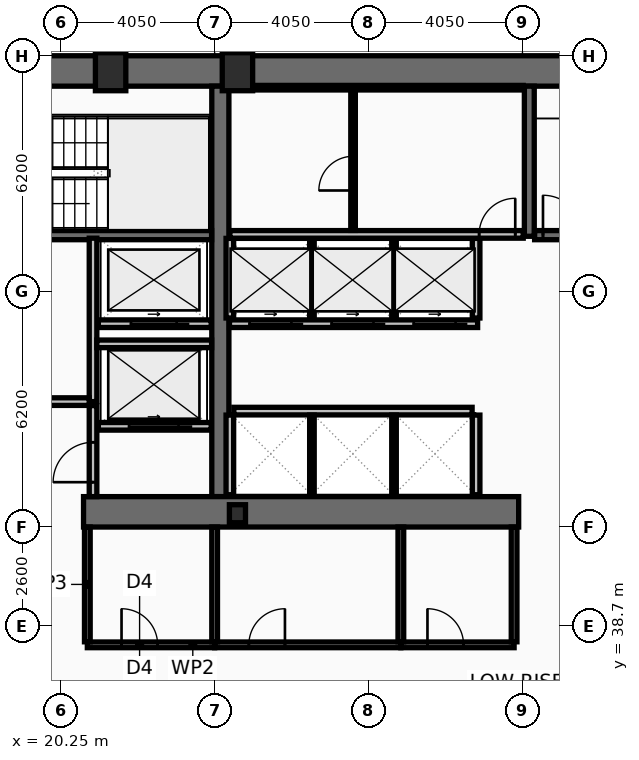
"""IFC4 building model, lengths in metres.
Left out: names, types, materials, properties, quantities, classifications, styles, units other than length and angle.
Written with IfcOpenShell. Run it as: python <this file> out.ifc"""

import sys

from ifc_helpers import new_model, si_unit, direction, frame, frame_2d, origin, origin_2d, place, context, subcontext, project, spatial, rectangle, hollow_rectangle, i_section, extrude, element, fill, save


model = new_model("IFC4")
c1 = context("Model", 3, precision=1e-05, world=origin(), true_north=direction((0.0, 1.0)))
c2 = subcontext(c1, "Body", "Model", "MODEL_VIEW")
j1 = project(units=[si_unit("LENGTHUNIT", "METRE"), si_unit("PLANEANGLEUNIT", "RADIAN")], contexts=[c1])
p1 = place(None, origin())
s1 = spatial("IfcSite", under=j1, at=p1, CompositionType="ELEMENT")
p2 = place(p1, origin())
s2 = spatial("IfcBuilding", under=s1, at=p2, CompositionType="ELEMENT")
p3 = place(p2, frame((0.0, 0.0, 65.8)))
s3 = spatial("IfcBuildingStorey", under=s2, at=p3, CompositionType="ELEMENT", Elevation=65.8)
p4 = place(p3, frame((16.2, 53.3, 0.0), z_axis=(0.0, 0.0, 1.0), x_axis=(1.0, 0.0, 0.0)))
e1 = element("IfcWall", 1, at=p4, inside=s3, PredefinedType="SHEAR", context=c2, shape_type="SweptSolid", body=[
    extrude(rectangle(XDim=40.5, YDim=0.8, at=frame_2d((20.25, 0.0))), origin(), (0.0, 0.0, 1.0), 3.82),
])
p5 = place(p3, frame((24.45, 42.1, 0.0), z_axis=(0.0, 0.0, 1.0), x_axis=(0.0, 1.0, 0.0)))
e2 = element("IfcWall", 2, at=p5, inside=s3, PredefinedType="SHEAR", context=c2, shape_type="SweptSolid", body=[
    extrude(rectangle(XDim=10.8, YDim=0.45, at=frame_2d((5.4, 0.0))), origin(), (0.0, 0.0, 1.0), 3.82),
])
p6 = place(p3, frame((32.3, 41.7, 0.0), z_axis=(0.0, 0.0, 1.0), x_axis=(-1.0, 0.0, 0.0)))
e3 = element("IfcWall", 3, at=p6, inside=s3, PredefinedType="SHEAR", context=c2, shape_type="SweptSolid", body=[
    extrude(rectangle(XDim=11.45, YDim=0.8, at=frame_2d((5.725, 0.0))), origin(), (0.0, 0.0, 1.0), 3.82),
])
p7 = place(p3, frame((32.58, 48.95, 0.0), z_axis=(0.0, 0.0, 1.0), x_axis=(0.0, 1.0, 0.0)))
e4 = element("IfcWall", 4, at=p7, inside=s3, PredefinedType="SHEAR", context=c2, shape_type="SweptSolid", body=[
    extrude(rectangle(XDim=3.95, YDim=0.26, at=frame_2d((1.975, 0.0))), origin(), (0.0, 0.0, 1.0), 3.82),
])
p8 = place(p3, frame((17.0, 48.98, 0.0), z_axis=(0.0, 0.0, 1.0), x_axis=(1.0, 0.0, 0.0)))
e5 = element("IfcWall", 5, at=p8, inside=s3, PredefinedType="SHEAR", context=c2, shape_type="SweptSolid", body=[
    extrude(rectangle(XDim=7.22, YDim=0.24, at=frame_2d((3.61, 0.0))), origin(), (0.0, 0.0, 1.0), 3.82),
])
p9 = place(p8, frame((0.22, 0.0, 0.0)))
e6 = element("IfcOpeningElement", 6, at=p9, cuts=e5, PredefinedType="OPENING", context=c2, shape_type="SweptSolid", body=[
    extrude(rectangle(XDim=1.05, YDim=2.15, at=frame_2d((0.525, 1.075))), frame((0.0, 0.13, 0.0), z_axis=(0.0, -1.0, 0.0), x_axis=(1.0, 0.0, 0.0)), (0.0, 0.0, 1.0), 0.26),
])
p10 = place(p3, frame((32.72, 48.98, 0.0), z_axis=(0.0, 0.0, 1.0), x_axis=(1.0, 0.0, 0.0)))
e7 = element("IfcWall", 7, at=p10, inside=s3, PredefinedType="SHEAR", context=c2, shape_type="SweptSolid", body=[
    extrude(rectangle(XDim=7.56, YDim=0.24, at=frame_2d((3.78, 0.0))), origin(), (0.0, 0.0, 1.0), 3.82),
])
p11 = place(p10, frame((0.22, 0.0, 0.0)))
e8 = element("IfcOpeningElement", 8, at=p11, cuts=e7, PredefinedType="OPENING", context=c2, shape_type="SweptSolid", body=[
    extrude(rectangle(XDim=1.05, YDim=2.15, at=frame_2d((0.525, 1.075))), frame((0.0, 0.13, 0.0), z_axis=(0.0, -1.0, 0.0), x_axis=(1.0, 0.0, 0.0)), (0.0, 0.0, 1.0), 0.26),
])
for number, where, z_axis, x_axis in (
    (9, (21.562, 53.28, 0.0), (0.0, 0.0, 1.0), (1.0, 0.0, 0.0)),
    (10, (24.9, 53.28, 0.0), (0.0, 0.0, 1.0), (1.0, 0.0, 0.0)),
):
    element("IfcColumn", number, at=place(p3, frame(where, z_axis=z_axis, x_axis=x_axis)), inside=s3, PredefinedType="COLUMN", context=c2, shape_type="SweptSolid", body=[
        extrude(hollow_rectangle(XDim=0.8, YDim=1.0, WallThickness=0.055, at=origin_2d()), origin(), (0.0, 0.0, 1.0), 4.0),
    ])
p12 = place(p3, frame((24.9, 41.65, 0.0), z_axis=(0.0, 0.0, 1.0), x_axis=(1.0, 0.0, 0.0)))
e11 = element("IfcColumn", 11, at=p12, inside=s3, PredefinedType="COLUMN", context=c2, shape_type="SweptSolid", body=[
    extrude(i_section(OverallWidth=0.424, OverallDepth=0.474, WebThickness=0.048, FlangeThickness=0.077, at=origin_2d()), origin(), (0.0, 0.0, 1.0), 4.0),
])
p13 = place(p3, frame((24.21, 43.95, 0.0), z_axis=(0.0, 0.0, 1.0), x_axis=(-1.0, 0.0, 0.0)))
e12 = element("IfcWall", 12, at=p13, inside=s3, PredefinedType="PARTITIONING", context=c2, shape_type="SweptSolid", body=[
    extrude(rectangle(XDim=2.97, YDim=0.2, at=frame_2d((1.485, 0.0))), origin(), (0.0, 0.0, 1.0), 3.82),
])
p14 = place(p13, frame((0.86, 0.0, 0.0)))
e13 = element("IfcOpeningElement", 13, at=p14, cuts=e12, PredefinedType="OPENING", context=c2, shape_type="SweptSolid", body=[
    extrude(rectangle(XDim=1.3, YDim=2.18, at=frame_2d((0.65, 1.09))), frame((0.0, 0.11, 0.0), z_axis=(0.0, -1.0, 0.0), x_axis=(1.0, 0.0, 0.0)), (0.0, 0.0, 1.0), 0.22),
])
p15 = place(p3, frame((24.21, 46.65, 0.0), z_axis=(0.0, 0.0, 1.0), x_axis=(-1.0, 0.0, 0.0)))
e14 = element("IfcWall", 14, at=p15, inside=s3, PredefinedType="PARTITIONING", context=c2, shape_type="SweptSolid", body=[
    extrude(rectangle(XDim=2.97, YDim=0.2, at=frame_2d((1.485, 0.0))), origin(), (0.0, 0.0, 1.0), 3.82),
])
p16 = place(p15, frame((0.91, 0.0, 0.0)))
e15 = element("IfcOpeningElement", 15, at=p16, cuts=e14, PredefinedType="OPENING", context=c2, shape_type="SweptSolid", body=[
    extrude(rectangle(XDim=1.2, YDim=2.18, at=frame_2d((0.6, 1.09))), frame((0.0, 0.11, 0.0), z_axis=(0.0, -1.0, 0.0), x_axis=(1.0, 0.0, 0.0)), (0.0, 0.0, 1.0), 0.22),
])
p17 = place(p3, frame((31.22, 46.65, 0.0), z_axis=(0.0, 0.0, 1.0), x_axis=(-1.0, 0.0, 0.0)))
e16 = element("IfcWall", 16, at=p17, inside=s3, PredefinedType="PARTITIONING", context=c2, shape_type="SweptSolid", body=[
    extrude(rectangle(XDim=6.53, YDim=0.2, at=frame_2d((3.265, 0.0))), origin(), (0.0, 0.0, 1.0), 3.82),
])
p18 = place(p17, frame((4.9, 0.0, 0.0)))
e17 = element("IfcOpeningElement", 17, at=p18, cuts=e16, PredefinedType="OPENING", context=c2, shape_type="SweptSolid", body=[
    extrude(rectangle(XDim=1.1, YDim=2.18, at=frame_2d((0.55, 1.09))), frame((0.0, 0.11, 0.0), z_axis=(0.0, -1.0, 0.0), x_axis=(1.0, 0.0, 0.0)), (0.0, 0.0, 1.0), 0.22),
])
p19 = place(p17, frame((2.74, 0.0, 0.0)))
e18 = element("IfcOpeningElement", 18, at=p19, cuts=e16, PredefinedType="OPENING", context=c2, shape_type="SweptSolid", body=[
    extrude(rectangle(XDim=1.1, YDim=2.18, at=frame_2d((0.55, 1.09))), frame((0.0, 0.11, 0.0), z_axis=(0.0, -1.0, 0.0), x_axis=(1.0, 0.0, 0.0)), (0.0, 0.0, 1.0), 0.22),
])
p20 = place(p17, frame((0.58, 0.0, 0.0)))
e19 = element("IfcOpeningElement", 19, at=p20, cuts=e16, PredefinedType="OPENING", context=c2, shape_type="SweptSolid", body=[
    extrude(rectangle(XDim=1.1, YDim=2.18, at=frame_2d((0.55, 1.09))), frame((0.0, 0.11, 0.0), z_axis=(0.0, -1.0, 0.0), x_axis=(1.0, 0.0, 0.0)), (0.0, 0.0, 1.0), 0.22),
])
p21 = place(p3, frame((21.1, 44.6, 0.0), z_axis=(0.0, 0.0, 1.0), x_axis=(0.0, 1.0, 0.0)))
e20 = element("IfcWall", 20, at=p21, inside=s3, PredefinedType="PARTITIONING", context=c2, shape_type="SweptSolid", body=[
    extrude(rectangle(XDim=4.3, YDim=0.2, at=frame_2d((2.15, 0.0))), origin(), (0.0, 0.0, 1.0), 3.82),
])
p22 = place(p3, frame((17.0, 44.6, 0.0), z_axis=(0.0, 0.0, 1.0), x_axis=(1.0, 0.0, 0.0)))
e21 = element("IfcWall", 21, at=p22, inside=s3, PredefinedType="PARTITIONING", context=c2, shape_type="SweptSolid", body=[
    extrude(rectangle(XDim=4.0, YDim=0.2, at=frame_2d((2.0, 0.0))), origin(), (0.0, 0.0, 1.0), 3.82),
])
p23 = place(p22, frame((1.25, 0.0, 0.0)))
e22 = element("IfcOpeningElement", 22, at=p23, cuts=e21, PredefinedType="OPENING", context=c2, shape_type="SweptSolid", body=[
    extrude(rectangle(XDim=1.05, YDim=2.15, at=frame_2d((0.525, 1.075))), frame((0.0, 0.11, 0.0), z_axis=(0.0, -1.0, 0.0), x_axis=(1.0, 0.0, 0.0)), (0.0, 0.0, 1.0), 0.22),
])
p24 = place(p3, frame((21.2, 46.12, 0.0), z_axis=(0.0, 0.0, 1.0), x_axis=(1.0, 0.0, 0.0)))
e23 = element("IfcWall", 23, at=p24, inside=s3, PredefinedType="PARTITIONING", context=c2, shape_type="SweptSolid", body=[
    extrude(rectangle(XDim=3.02, YDim=0.2, at=frame_2d((1.51, 0.0))), origin(), (0.0, 0.0, 1.0), 3.82),
])
p25 = place(p3, frame((21.1, 42.1, 0.0), z_axis=(0.0, 0.0, 1.0), x_axis=(0.0, 1.0, 0.0)))
e24 = element("IfcWall", 24, at=p25, inside=s3, PredefinedType="PARTITIONING", context=c2, shape_type="SweptSolid", body=[
    extrude(rectangle(XDim=2.395, YDim=0.2, at=frame_2d((1.198, 0.0))), origin(), (0.0, 0.0, 1.0), 3.82),
])
p26 = place(p25, frame((0.38, 0.0, 0.0)))
e25 = element("IfcOpeningElement", 25, at=p26, cuts=e24, PredefinedType="OPENING", context=c2, shape_type="SweptSolid", body=[
    extrude(rectangle(XDim=1.05, YDim=2.15, at=frame_2d((0.525, 1.075))), frame((0.0, 0.11, 0.0), z_axis=(0.0, -1.0, 0.0), x_axis=(1.0, 0.0, 0.0)), (0.0, 0.0, 1.0), 0.22),
])
for number, where, z_axis, x_axis in (
    (26, (24.7, 46.8, 0.0), (0.0, 0.0, 1.0), (0.0, 1.0, 0.0)),
    (27, (31.18, 46.8, 0.0), (0.0, 0.0, 1.0), (0.0, 1.0, 0.0)),
):
    element("IfcWall", number, at=place(p3, frame(where, z_axis=z_axis, x_axis=x_axis)), inside=s3, PredefinedType="PARTITIONING", context=c2, shape_type="SweptSolid", body=[
        extrude(rectangle(XDim=2.095, YDim=0.2, at=frame_2d((1.047, 0.0))), origin(), (0.0, 0.0, 1.0), 3.82),
    ])
for number, where, z_axis, x_axis in (
    (28, (26.86, 46.8, 0.0), (0.0, 0.0, 1.0), (0.0, 1.0, 0.0)),
    (29, (29.02, 46.8, 0.0), (0.0, 0.0, 1.0), (0.0, 1.0, 0.0)),
):
    element("IfcWall", number, at=place(p3, frame(where, z_axis=z_axis, x_axis=x_axis)), inside=s3, PredefinedType="PARTITIONING", context=c2, shape_type="SweptSolid", body=[
        extrude(rectangle(XDim=2.095, YDim=0.12, at=frame_2d((1.047, 0.0))), origin(), (0.0, 0.0, 1.0), 3.82),
    ])
p27 = place(p3, frame((24.805, 44.35, 0.0), z_axis=(0.0, 0.0, 1.0), x_axis=(1.0, 0.0, 0.0)))
e30 = element("IfcWall", 30, at=p27, inside=s3, PredefinedType="PARTITIONING", context=c2, shape_type="SweptSolid", body=[
    extrude(rectangle(XDim=6.27, YDim=0.2, at=frame_2d((3.135, 0.0))), origin(), (0.0, 0.0, 1.0), 3.82),
])
for number, where, z_axis, x_axis in (
    (31, (24.7, 42.15, 0.0), (0.0, 0.0, 1.0), (0.0, 1.0, 0.0)),
    (32, (31.18, 42.15, 0.0), (0.0, 0.0, 1.0), (0.0, 1.0, 0.0)),
):
    element("IfcWall", number, at=place(p3, frame(where, z_axis=z_axis, x_axis=x_axis)), inside=s3, PredefinedType="PARTITIONING", context=c2, shape_type="SweptSolid", body=[
        extrude(rectangle(XDim=2.095, YDim=0.2, at=frame_2d((1.048, 0.0))), origin(), (0.0, 0.0, 1.0), 3.82),
    ])
for number, where, z_axis, x_axis in (
    (33, (26.86, 42.15, 0.0), (0.0, 0.0, 1.0), (0.0, 1.0, 0.0)),
    (34, (29.02, 42.15, 0.0), (0.0, 0.0, 1.0), (0.0, 1.0, 0.0)),
):
    element("IfcWall", number, at=place(p3, frame(where, z_axis=z_axis, x_axis=x_axis)), inside=s3, PredefinedType="PARTITIONING", context=c2, shape_type="SweptSolid", body=[
        extrude(rectangle(XDim=2.095, YDim=0.12, at=frame_2d((1.048, 0.0))), origin(), (0.0, 0.0, 1.0), 3.82),
    ])
p28 = place(p3, frame((24.7, 52.86, 0.0), z_axis=(0.0, 0.0, 1.0), x_axis=(1.0, 0.0, 0.0)))
e35 = element("IfcWall", 35, at=p28, inside=s3, PredefinedType="PARTITIONING", context=c2, shape_type="SweptSolid", body=[
    extrude(rectangle(XDim=7.72, YDim=0.12, at=frame_2d((3.86, 0.0))), origin(), (0.0, 0.0, 1.0), 3.82),
])
p29 = place(p3, frame((24.7, 49.0, 0.0), z_axis=(0.0, 0.0, 1.0), x_axis=(1.0, 0.0, 0.0)))
e36 = element("IfcWall", 36, at=p29, inside=s3, PredefinedType="PARTITIONING", context=c2, shape_type="SweptSolid", body=[
    extrude(rectangle(XDim=7.72, YDim=0.2, at=frame_2d((3.86, 0.0))), origin(), (0.0, 0.0, 1.0), 3.82),
])
p30 = place(p29, frame((6.56, 0.0, 0.0)))
e37 = element("IfcOpeningElement", 37, at=p30, cuts=e36, PredefinedType="OPENING", context=c2, shape_type="SweptSolid", body=[
    extrude(rectangle(XDim=0.95, YDim=2.1, at=frame_2d((0.475, 1.05))), frame((0.0, 0.11, 0.0), z_axis=(0.0, -1.0, 0.0), x_axis=(1.0, 0.0, 0.0)), (0.0, 0.0, 1.0), 0.22),
])
p31 = place(p3, frame((27.942, 49.105, 0.0), z_axis=(0.0, 0.0, 1.0), x_axis=(0.0, 1.0, 0.0)))
e38 = element("IfcWall", 38, at=p31, inside=s3, PredefinedType="PARTITIONING", context=c2, shape_type="SweptSolid", body=[
    extrude(rectangle(XDim=3.69, YDim=0.12, at=frame_2d((1.845, 0.0))), origin(), (0.0, 0.0, 1.0), 3.82),
])
p32 = place(p31, frame((1.05, 0.0, 0.0)))
e39 = element("IfcOpeningElement", 39, at=p32, cuts=e38, PredefinedType="OPENING", context=c2, shape_type="SweptSolid", body=[
    extrude(rectangle(XDim=0.9, YDim=2.05, at=frame_2d((0.45, 1.025))), frame((0.0, 0.07, 0.0), z_axis=(0.0, -1.0, 0.0), x_axis=(1.0, 0.0, 0.0)), (0.0, 0.0, 1.0), 0.14),
])
p33 = place(p3, frame((20.95, 38.2, 0.0), z_axis=(0.0, 0.0, 1.0), x_axis=(1.0, 0.0, 0.0)))
e40 = element("IfcWall", 40, at=p33, inside=s3, PredefinedType="PARTITIONING", context=c2, shape_type="SweptSolid", body=[
    extrude(rectangle(XDim=3.35, YDim=0.15, at=frame_2d((1.675, 0.0))), origin(), (0.0, 0.0, 1.0), 3.82),
])
p34 = place(p33, frame((0.9, 0.0, 0.0)))
e41 = element("IfcOpeningElement", 41, at=p34, cuts=e40, PredefinedType="OPENING", context=c2, shape_type="SweptSolid", body=[
    extrude(rectangle(XDim=0.95, YDim=2.05, at=frame_2d((0.475, 1.025))), frame((0.0, 0.085, 0.0), z_axis=(0.0, -1.0, 0.0), x_axis=(1.0, 0.0, 0.0)), (0.0, 0.0, 1.0), 0.17),
])
p35 = place(p3, frame((24.3, 38.2, 0.0), z_axis=(0.0, 0.0, 1.0), x_axis=(1.0, 0.0, 0.0)))
e42 = element("IfcWall", 42, at=p35, inside=s3, PredefinedType="PARTITIONING", context=c2, shape_type="SweptSolid", body=[
    extrude(rectangle(XDim=4.9, YDim=0.15, at=frame_2d((2.45, 0.0))), origin(), (0.0, 0.0, 1.0), 3.01),
])
p36 = place(p35, frame((0.9, 0.0, 0.0)))
e43 = element("IfcOpeningElement", 43, at=p36, cuts=e42, PredefinedType="OPENING", context=c2, shape_type="SweptSolid", body=[
    extrude(rectangle(XDim=0.95, YDim=2.05, at=frame_2d((0.475, 1.025))), frame((0.0, 0.085, 0.0), z_axis=(0.0, -1.0, 0.0), x_axis=(1.0, 0.0, 0.0)), (0.0, 0.0, 1.0), 0.17),
])
p37 = place(p3, frame((29.2, 38.2, 0.0), z_axis=(0.0, 0.0, 1.0), x_axis=(1.0, 0.0, 0.0)))
e44 = element("IfcWall", 44, at=p37, inside=s3, PredefinedType="PARTITIONING", context=c2, shape_type="SweptSolid", body=[
    extrude(rectangle(XDim=2.98, YDim=0.15, at=frame_2d((1.49, 0.0))), origin(), (0.0, 0.0, 1.0), 3.01),
])
p38 = place(p37, frame((0.7, 0.0, 0.0)))
e45 = element("IfcOpeningElement", 45, at=p38, cuts=e44, PredefinedType="OPENING", context=c2, shape_type="SweptSolid", body=[
    extrude(rectangle(XDim=0.95, YDim=2.05, at=frame_2d((0.475, 1.025))), frame((0.0, 0.085, 0.0), z_axis=(0.0, -1.0, 0.0), x_axis=(1.0, 0.0, 0.0)), (0.0, 0.0, 1.0), 0.17),
])
for number, where, z_axis, x_axis in (
    (46, (20.95, 38.28, 0.0), (0.0, 0.0, 1.0), (0.0, 1.0, 0.0)),
    (47, (24.3, 38.28, 0.0), (0.0, 0.0, 1.0), (0.0, 1.0, 0.0)),
    (48, (29.2, 38.28, 0.0), (0.0, 0.0, 1.0), (0.0, 1.0, 0.0)),
    (49, (32.18, 38.28, 0.0), (0.0, 0.0, 1.0), (0.0, 1.0, 0.0)),
):
    element("IfcWall", number, at=place(p3, frame(where, z_axis=z_axis, x_axis=x_axis)), inside=s3, PredefinedType="PARTITIONING", context=c2, shape_type="SweptSolid", body=[
        extrude(rectangle(XDim=3.02, YDim=0.15, at=frame_2d((1.51, 0.0))), origin(), (0.0, 0.0, 1.0), 3.82),
    ])
p39 = place(p11, origin())
e50 = element("IfcDoor", 50, at=p39, inside=s3, OperationType="SINGLE_SWING_LEFT", PredefinedType="DOOR", context=c2, shape_type="SweptSolid", body=[
    extrude(rectangle(XDim=1.05, YDim=2.15, at=frame_2d((0.525, 1.075))), frame((0.0, 0.025, 0.0), z_axis=(0.0, -1.0, 0.0), x_axis=(1.0, 0.0, 0.0)), (0.0, 0.0, 1.0), 0.05),
])
fill(e8, e50)
p40 = place(p14, origin())
e51 = element("IfcDoor", 51, at=p40, inside=s3, OperationType="SLIDING_TO_LEFT", PredefinedType="DOOR", context=c2, shape_type="SweptSolid", body=[
    extrude(rectangle(XDim=1.3, YDim=2.18, at=frame_2d((0.65, 1.09))), frame((0.0, 0.025, 0.0), z_axis=(0.0, -1.0, 0.0), x_axis=(1.0, 0.0, 0.0)), (0.0, 0.0, 1.0), 0.05),
])
fill(e13, e51)
p41 = place(p16, origin())
e52 = element("IfcDoor", 52, at=p41, inside=s3, OperationType="SLIDING_TO_LEFT", PredefinedType="DOOR", context=c2, shape_type="SweptSolid", body=[
    extrude(rectangle(XDim=1.2, YDim=2.18, at=frame_2d((0.6, 1.09))), frame((0.0, 0.025, 0.0), z_axis=(0.0, -1.0, 0.0), x_axis=(1.0, 0.0, 0.0)), (0.0, 0.0, 1.0), 0.05),
])
fill(e15, e52)
p42 = place(p18, origin())
e53 = element("IfcDoor", 53, at=p42, inside=s3, OperationType="SLIDING_TO_LEFT", PredefinedType="DOOR", context=c2, shape_type="SweptSolid", body=[
    extrude(rectangle(XDim=1.1, YDim=2.18, at=frame_2d((0.55, 1.09))), frame((0.0, 0.025, 0.0), z_axis=(0.0, -1.0, 0.0), x_axis=(1.0, 0.0, 0.0)), (0.0, 0.0, 1.0), 0.05),
])
fill(e17, e53)
p43 = place(p19, origin())
e54 = element("IfcDoor", 54, at=p43, inside=s3, OperationType="SLIDING_TO_LEFT", PredefinedType="DOOR", context=c2, shape_type="SweptSolid", body=[
    extrude(rectangle(XDim=1.1, YDim=2.18, at=frame_2d((0.55, 1.09))), frame((0.0, 0.025, 0.0), z_axis=(0.0, -1.0, 0.0), x_axis=(1.0, 0.0, 0.0)), (0.0, 0.0, 1.0), 0.05),
])
fill(e18, e54)
p44 = place(p20, origin())
e55 = element("IfcDoor", 55, at=p44, inside=s3, OperationType="SLIDING_TO_LEFT", PredefinedType="DOOR", context=c2, shape_type="SweptSolid", body=[
    extrude(rectangle(XDim=1.1, YDim=2.18, at=frame_2d((0.55, 1.09))), frame((0.0, 0.025, 0.0), z_axis=(0.0, -1.0, 0.0), x_axis=(1.0, 0.0, 0.0)), (0.0, 0.0, 1.0), 0.05),
])
fill(e19, e55)
p45 = place(p26, origin())
e56 = element("IfcDoor", 56, at=p45, inside=s3, OperationType="SINGLE_SWING_LEFT", PredefinedType="DOOR", context=c2, shape_type="SweptSolid", body=[
    extrude(rectangle(XDim=1.05, YDim=2.15, at=frame_2d((0.525, 1.075))), frame((0.0, 0.025, 0.0), z_axis=(0.0, -1.0, 0.0), x_axis=(1.0, 0.0, 0.0)), (0.0, 0.0, 1.0), 0.05),
])
fill(e25, e56)
p46 = place(p30, origin())
e57 = element("IfcDoor", 57, at=p46, inside=s3, OperationType="SINGLE_SWING_RIGHT", PredefinedType="DOOR", context=c2, shape_type="SweptSolid", body=[
    extrude(rectangle(XDim=0.95, YDim=2.1, at=frame_2d((0.475, 1.05))), frame((0.0, 0.025, 0.0), z_axis=(0.0, -1.0, 0.0), x_axis=(1.0, 0.0, 0.0)), (0.0, 0.0, 1.0), 0.05),
])
fill(e37, e57)
p47 = place(p32, origin())
e58 = element("IfcDoor", 58, at=p47, inside=s3, OperationType="SINGLE_SWING_LEFT", PredefinedType="DOOR", context=c2, shape_type="SweptSolid", body=[
    extrude(rectangle(XDim=0.9, YDim=2.05, at=frame_2d((0.45, 1.025))), frame((0.0, 0.025, 0.0), z_axis=(0.0, -1.0, 0.0), x_axis=(1.0, 0.0, 0.0)), (0.0, 0.0, 1.0), 0.05),
])
fill(e39, e58)
p48 = place(p34, origin())
e59 = element("IfcDoor", 59, at=p48, inside=s3, OperationType="SINGLE_SWING_LEFT", PredefinedType="DOOR", context=c2, shape_type="SweptSolid", body=[
    extrude(rectangle(XDim=0.95, YDim=2.05, at=frame_2d((0.475, 1.025))), frame((0.0, 0.025, 0.0), z_axis=(0.0, -1.0, 0.0), x_axis=(1.0, 0.0, 0.0)), (0.0, 0.0, 1.0), 0.05),
])
fill(e41, e59)
p49 = place(p36, origin())
e60 = element("IfcDoor", 60, at=p49, inside=s3, OperationType="SINGLE_SWING_RIGHT", PredefinedType="DOOR", context=c2, shape_type="SweptSolid", body=[
    extrude(rectangle(XDim=0.95, YDim=2.05, at=frame_2d((0.475, 1.025))), frame((0.0, 0.025, 0.0), z_axis=(0.0, -1.0, 0.0), x_axis=(1.0, 0.0, 0.0)), (0.0, 0.0, 1.0), 0.05),
])
fill(e43, e60)
p50 = place(p38, origin())
e61 = element("IfcDoor", 61, at=p50, inside=s3, OperationType="SINGLE_SWING_LEFT", PredefinedType="DOOR", context=c2, shape_type="SweptSolid", body=[
    extrude(rectangle(XDim=0.95, YDim=2.05, at=frame_2d((0.475, 1.025))), frame((0.0, 0.025, 0.0), z_axis=(0.0, -1.0, 0.0), x_axis=(1.0, 0.0, 0.0)), (0.0, 0.0, 1.0), 0.05),
])
fill(e45, e61)
save(model, sys.argv[1])
